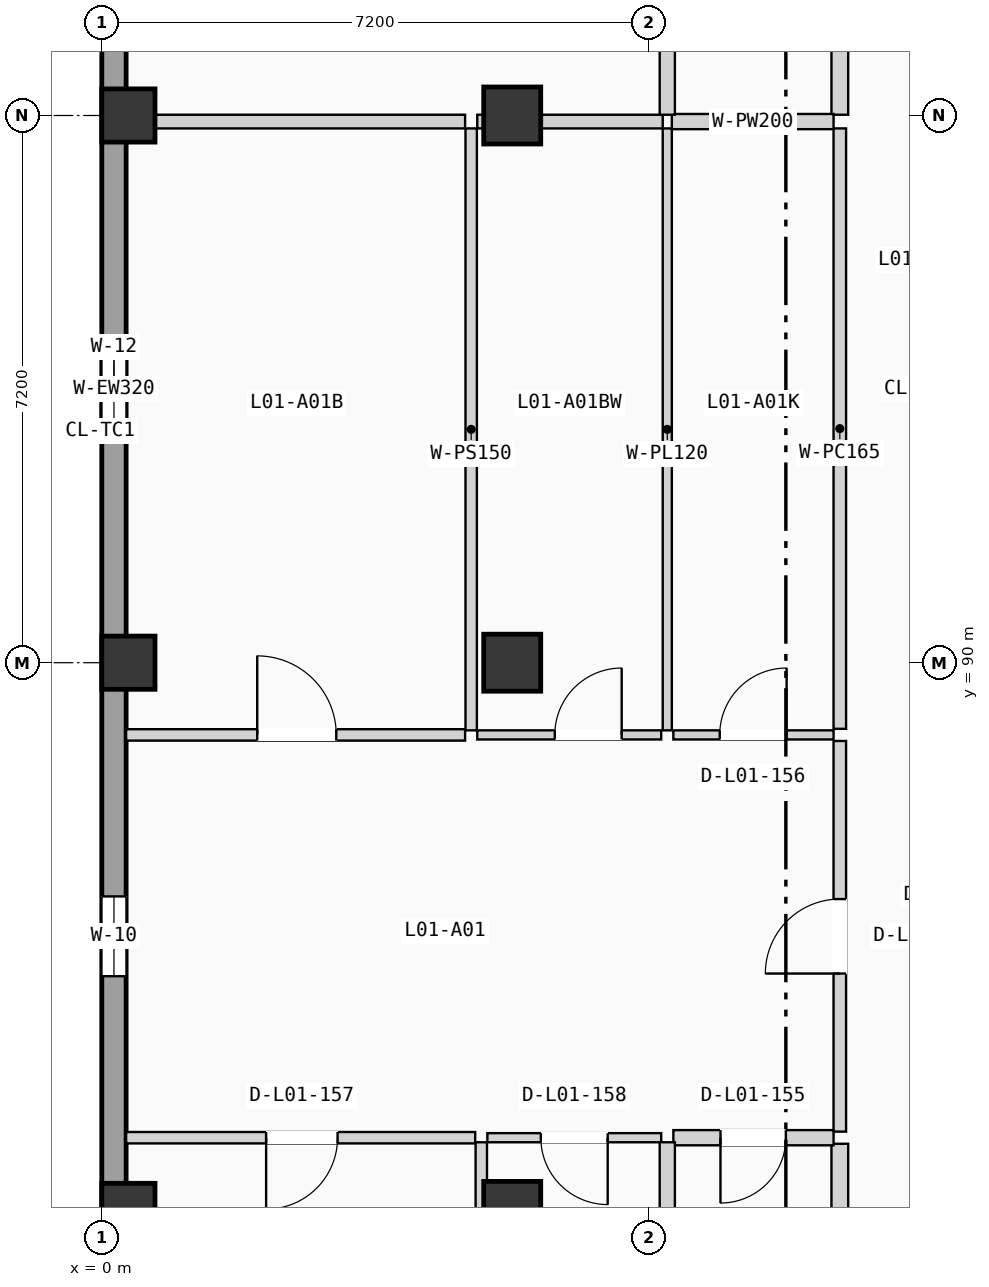
"""IFC4 building model, lengths in metres.
Left out: names, types, materials, properties, quantities, classifications, styles, units other than length and angle.
Written with IfcOpenShell. Run it as: python <this file> out.ifc"""

import sys

from ifc_helpers import new_model, si_unit, direction, frame, frame_2d, origin, origin_2d, place, context, subcontext, project, spatial, rectangle, extrude, element, fill, save


model = new_model("IFC4")
c1 = context("Model", 3, precision=1e-05, world=origin(), true_north=direction((0.0, 1.0)))
c2 = subcontext(c1, "Body", "Model", "MODEL_VIEW")
j1 = project(units=[si_unit("LENGTHUNIT", "METRE"), si_unit("PLANEANGLEUNIT", "RADIAN")], contexts=[c1])
p1 = place(None, origin())
s1 = spatial("IfcSite", under=j1, at=p1, CompositionType="ELEMENT")
p2 = place(p1, origin())
s2 = spatial("IfcBuilding", under=s1, at=p2, CompositionType="ELEMENT")
p3 = place(p2, frame((0.0, 0.0, 4.9)))
s3 = spatial("IfcBuildingStorey", under=s2, at=p3, CompositionType="ELEMENT", Elevation=4.9)
for number, where, z_axis, x_axis in (
    (1, (0.35, 82.8, 0.0), (0.0, 0.0, 1.0), (1.0, 0.0, 0.0)),
    (2, (0.35, 90.0, 0.0), (0.0, 0.0, 1.0), (1.0, 0.0, 0.0)),
    (3, (0.35, 97.2, 0.0), (0.0, 0.0, 1.0), (1.0, 0.0, 0.0)),
):
    element("IfcColumn", number, at=place(p3, frame(where, z_axis=z_axis, x_axis=x_axis)), inside=s3, PredefinedType="COLUMN", context=c2, shape_type="SweptSolid", body=[
        extrude(rectangle(XDim=0.7, YDim=0.7, at=origin_2d()), origin(), (0.0, 0.0, 1.0), 3.675),
    ])
for number, where, z_axis, x_axis in (
    (4, (5.4, 82.8, 0.0), (0.0, 0.0, 1.0), (1.0, 0.0, 0.0)),
    (5, (5.4, 90.0, 0.0), (0.0, 0.0, 1.0), (1.0, 0.0, 0.0)),
    (6, (5.4, 97.2, 0.0), (0.0, 0.0, 1.0), (1.0, 0.0, 0.0)),
):
    element("IfcColumn", number, at=place(p3, frame(where, z_axis=z_axis, x_axis=x_axis)), inside=s3, PredefinedType="COLUMN", context=c2, shape_type="SweptSolid", body=[
        extrude(rectangle(XDim=0.75, YDim=0.75, at=origin_2d()), origin(), (0.0, 0.0, 1.0), 3.675),
    ])
p4 = place(p3, frame((0.16, 68.72, 0.0), z_axis=(0.0, 0.0, 1.0), x_axis=(0.0, 1.0, 0.0)))
e7 = element("IfcWall", 7, at=p4, inside=s3, PredefinedType="SOLIDWALL", context=c2, shape_type="SweptSolid", body=[
    extrude(rectangle(XDim=49.76, YDim=0.32, at=frame_2d((24.88, 0.0))), origin(), (0.0, 0.0, 1.0), 3.415),
])
p5 = place(p4, frame((17.155, 0.0, 0.9)))
e8 = element("IfcOpeningElement", 8, at=p5, cuts=e7, PredefinedType="OPENING", context=c2, shape_type="SweptSolid", body=[
    extrude(rectangle(XDim=1.05, YDim=1.8, at=frame_2d((0.525, 0.9))), frame((0.0, 0.17, 0.0), z_axis=(0.0, -1.0, 0.0), x_axis=(1.0, 0.0, 0.0)), (0.0, 0.0, 1.0), 0.34),
])
p6 = place(p4, frame((9.97, 0.0, 0.9)))
e9 = element("IfcOpeningElement", 9, at=p6, cuts=e7, PredefinedType="OPENING", context=c2, shape_type="SweptSolid", body=[
    extrude(rectangle(XDim=1.15, YDim=1.2, at=frame_2d((0.575, 0.6))), frame((0.0, 0.17, 0.0), z_axis=(0.0, -1.0, 0.0), x_axis=(1.0, 0.0, 0.0)), (0.0, 0.0, 1.0), 0.34),
])
p7 = place(p4, frame((24.305, 0.0, 0.9)))
e10 = element("IfcOpeningElement", 10, at=p7, cuts=e7, PredefinedType="OPENING", context=c2, shape_type="SweptSolid", body=[
    extrude(rectangle(XDim=1.15, YDim=1.35, at=frame_2d((0.575, 0.675))), frame((0.0, 0.17, 0.0), z_axis=(0.0, -1.0, 0.0), x_axis=(1.0, 0.0, 0.0)), (0.0, 0.0, 1.0), 0.34),
])
p8 = place(p4, frame((33.584, 0.0, 0.9)))
e11 = element("IfcOpeningElement", 11, at=p8, cuts=e7, PredefinedType="OPENING", context=c2, shape_type="SweptSolid", body=[
    extrude(rectangle(XDim=1.15, YDim=1.5, at=frame_2d((0.575, 0.75))), frame((0.0, 0.17, 0.0), z_axis=(0.0, -1.0, 0.0), x_axis=(1.0, 0.0, 0.0)), (0.0, 0.0, 1.0), 0.34),
])
p9 = place(p4, frame((30.174, 0.0, 0.9)))
e12 = element("IfcOpeningElement", 12, at=p9, cuts=e7, PredefinedType="OPENING", context=c2, shape_type="SweptSolid", body=[
    extrude(rectangle(XDim=1.15, YDim=1.65, at=frame_2d((0.575, 0.825))), frame((0.0, 0.17, 0.0), z_axis=(0.0, -1.0, 0.0), x_axis=(1.0, 0.0, 0.0)), (0.0, 0.0, 1.0), 0.34),
])
p10 = place(p4, frame((39.776, 0.0, 0.9)))
e13 = element("IfcOpeningElement", 13, at=p10, cuts=e7, PredefinedType="OPENING", context=c2, shape_type="SweptSolid", body=[
    extrude(rectangle(XDim=1.15, YDim=1.8, at=frame_2d((0.575, 0.9))), frame((0.0, 0.17, 0.0), z_axis=(0.0, -1.0, 0.0), x_axis=(1.0, 0.0, 0.0)), (0.0, 0.0, 1.0), 0.34),
])
p11 = place(p3, frame((9.71, 83.83, 0.0), z_axis=(0.0, 0.0, 1.0), x_axis=(0.0, 1.0, 0.0)))
e14 = element("IfcWall", 14, at=p11, inside=s3, PredefinedType="PARTITIONING", context=c2, shape_type="SweptSolid", body=[
    extrude(rectangle(XDim=5.14, YDim=0.165, at=frame_2d((2.57, 0.0))), origin(), (0.0, 0.0, 1.0), 3.395),
])
p12 = place(p11, frame((2.08, 0.0, 0.0)))
e15 = element("IfcOpeningElement", 15, at=p12, cuts=e14, PredefinedType="OPENING", context=c2, shape_type="SweptSolid", body=[
    extrude(rectangle(XDim=0.98, YDim=2.08, at=frame_2d((0.49, 1.04))), frame((0.0, 0.093, 0.0), z_axis=(0.0, -1.0, 0.0), x_axis=(1.0, 0.0, 0.0)), (0.0, 0.0, 1.0), 0.185),
])
p13 = place(p3, frame((9.71, 76.0, 0.0), z_axis=(0.0, 0.0, 1.0), x_axis=(0.0, 1.0, 0.0)))
e16 = element("IfcWall", 16, at=p13, inside=s3, PredefinedType="PLUMBINGWALL", context=c2, shape_type="SweptSolid", body=[
    extrude(rectangle(XDim=7.67, YDim=0.22, at=frame_2d((3.835, 0.0))), origin(), (0.0, 0.0, 1.0), 3.395),
])
p14 = place(p3, frame((9.71, 89.13, 0.0), z_axis=(0.0, 0.0, 1.0), x_axis=(0.0, 1.0, 0.0)))
e17 = element("IfcWall", 17, at=p14, inside=s3, PredefinedType="PARTITIONING", context=c2, shape_type="SweptSolid", body=[
    extrude(rectangle(XDim=7.9, YDim=0.165, at=frame_2d((3.95, 0.0))), origin(), (0.0, 0.0, 1.0), 3.395),
])
p15 = place(p3, frame((9.71, 97.21, 0.0), z_axis=(0.0, 0.0, 1.0), x_axis=(0.0, 1.0, 0.0)))
e18 = element("IfcWall", 18, at=p15, inside=s3, PredefinedType="PLUMBINGWALL", context=c2, shape_type="SweptSolid", body=[
    extrude(rectangle(XDim=4.257, YDim=0.22, at=frame_2d((2.128, 0.0))), origin(), (0.0, 0.0, 1.0), 3.395),
])
p16 = place(p3, frame((7.52, 83.75, 0.0), z_axis=(0.0, 0.0, 1.0), x_axis=(1.0, 0.0, 0.0)))
e19 = element("IfcWall", 19, at=p16, inside=s3, PredefinedType="PLUMBINGWALL", context=c2, shape_type="SweptSolid", body=[
    extrude(rectangle(XDim=2.108, YDim=0.2, at=frame_2d((1.054, 0.0))), origin(), (0.0, 0.0, 1.0), 3.395),
])
p17 = place(p16, frame((0.62, 0.0, 0.0)))
e20 = element("IfcOpeningElement", 20, at=p17, cuts=e19, PredefinedType="OPENING", context=c2, shape_type="SweptSolid", body=[
    extrude(rectangle(XDim=0.86, YDim=2.0, at=frame_2d((0.43, 1.0))), frame((0.0, 0.11, 0.0), z_axis=(0.0, -1.0, 0.0), x_axis=(1.0, 0.0, 0.0)), (0.0, 0.0, 1.0), 0.22),
])
p18 = place(p3, frame((7.52, 89.05, 0.0), z_axis=(0.0, 0.0, 1.0), x_axis=(1.0, 0.0, 0.0)))
e21 = element("IfcWall", 21, at=p18, inside=s3, PredefinedType="PARTITIONING", context=c2, shape_type="SweptSolid", body=[
    extrude(rectangle(XDim=2.108, YDim=0.12, at=frame_2d((1.054, 0.0))), origin(), (0.0, 0.0, 1.0), 3.395),
])
p19 = place(p18, frame((0.61, 0.0, 0.0)))
e22 = element("IfcOpeningElement", 22, at=p19, cuts=e21, PredefinedType="OPENING", context=c2, shape_type="SweptSolid", body=[
    extrude(rectangle(XDim=0.88, YDim=2.02, at=frame_2d((0.44, 1.01))), frame((0.0, 0.07, 0.0), z_axis=(0.0, -1.0, 0.0), x_axis=(1.0, 0.0, 0.0)), (0.0, 0.0, 1.0), 0.14),
])
p20 = place(p3, frame((0.32, 83.75, 0.0), z_axis=(0.0, 0.0, 1.0), x_axis=(1.0, 0.0, 0.0)))
e23 = element("IfcWall", 23, at=p20, inside=s3, PredefinedType="PARTITIONING", context=c2, shape_type="SweptSolid", body=[
    extrude(rectangle(XDim=4.593, YDim=0.15, at=frame_2d((2.296, 0.0))), origin(), (0.0, 0.0, 1.0), 3.395),
])
p21 = place(p20, frame((1.842, 0.0, 0.0)))
e24 = element("IfcOpeningElement", 24, at=p21, cuts=e23, PredefinedType="OPENING", context=c2, shape_type="SweptSolid", body=[
    extrude(rectangle(XDim=0.94, YDim=2.06, at=frame_2d((0.47, 1.03))), frame((0.0, 0.085, 0.0), z_axis=(0.0, -1.0, 0.0), x_axis=(1.0, 0.0, 0.0)), (0.0, 0.0, 1.0), 0.17),
])
p22 = place(p3, frame((5.073, 83.75, 0.0), z_axis=(0.0, 0.0, 1.0), x_axis=(1.0, 0.0, 0.0)))
e25 = element("IfcWall", 25, at=p22, inside=s3, PredefinedType="PARTITIONING", context=c2, shape_type="SweptSolid", body=[
    extrude(rectangle(XDim=2.287, YDim=0.12, at=frame_2d((1.144, 0.0))), origin(), (0.0, 0.0, 1.0), 3.395),
])
p23 = place(p22, frame((0.703, 0.0, 0.0)))
e26 = element("IfcOpeningElement", 26, at=p23, cuts=e25, PredefinedType="OPENING", context=c2, shape_type="SweptSolid", body=[
    extrude(rectangle(XDim=0.88, YDim=2.02, at=frame_2d((0.44, 1.01))), frame((0.0, 0.07, 0.0), z_axis=(0.0, -1.0, 0.0), x_axis=(1.0, 0.0, 0.0)), (0.0, 0.0, 1.0), 0.14),
])
p24 = place(p3, frame((0.32, 89.05, 0.0), z_axis=(0.0, 0.0, 1.0), x_axis=(1.0, 0.0, 0.0)))
e27 = element("IfcWall", 27, at=p24, inside=s3, PredefinedType="PARTITIONING", context=c2, shape_type="SweptSolid", body=[
    extrude(rectangle(XDim=4.46, YDim=0.15, at=frame_2d((2.23, 0.0))), origin(), (0.0, 0.0, 1.0), 3.395),
])
p25 = place(p24, frame((1.725, 0.0, 0.0)))
e28 = element("IfcOpeningElement", 28, at=p25, cuts=e27, PredefinedType="OPENING", context=c2, shape_type="SweptSolid", body=[
    extrude(rectangle(XDim=1.04, YDim=2.08, at=frame_2d((0.52, 1.04))), frame((0.0, 0.085, 0.0), z_axis=(0.0, -1.0, 0.0), x_axis=(1.0, 0.0, 0.0)), (0.0, 0.0, 1.0), 0.17),
])
p26 = place(p3, frame((4.94, 89.05, 0.0), z_axis=(0.0, 0.0, 1.0), x_axis=(1.0, 0.0, 0.0)))
e29 = element("IfcWall", 29, at=p26, inside=s3, PredefinedType="PARTITIONING", context=c2, shape_type="SweptSolid", body=[
    extrude(rectangle(XDim=2.42, YDim=0.12, at=frame_2d((1.21, 0.0))), origin(), (0.0, 0.0, 1.0), 3.395),
])
p27 = place(p26, frame((1.02, 0.0, 0.0)))
e30 = element("IfcOpeningElement", 30, at=p27, cuts=e29, PredefinedType="OPENING", context=c2, shape_type="SweptSolid", body=[
    extrude(rectangle(XDim=0.88, YDim=2.02, at=frame_2d((0.44, 1.01))), frame((0.0, 0.07, 0.0), z_axis=(0.0, -1.0, 0.0), x_axis=(1.0, 0.0, 0.0)), (0.0, 0.0, 1.0), 0.14),
])
p28 = place(p3, frame((7.44, 76.0, 0.0), z_axis=(0.0, 0.0, 1.0), x_axis=(0.0, 1.0, 0.0)))
e31 = element("IfcWall", 31, at=p28, inside=s3, PredefinedType="PLUMBINGWALL", context=c2, shape_type="SweptSolid", body=[
    extrude(rectangle(XDim=7.69, YDim=0.2, at=frame_2d((3.845, 0.0))), origin(), (0.0, 0.0, 1.0), 3.395),
])
p29 = place(p28, frame((3.41, 0.0, 0.0)))
e32 = element("IfcOpeningElement", 32, at=p29, cuts=e31, PredefinedType="OPENING", context=c2, shape_type="SweptSolid", body=[
    extrude(rectangle(XDim=0.85, YDim=2.01, at=frame_2d((0.425, 1.005))), frame((0.0, 0.11, 0.0), z_axis=(0.0, -1.0, 0.0), x_axis=(1.0, 0.0, 0.0)), (0.0, 0.0, 1.0), 0.22),
])
p30 = place(p3, frame((7.44, 89.11, 0.0), z_axis=(0.0, 0.0, 1.0), x_axis=(0.0, 1.0, 0.0)))
e33 = element("IfcWall", 33, at=p30, inside=s3, PredefinedType="PARTITIONING", context=c2, shape_type="SweptSolid", body=[
    extrude(rectangle(XDim=7.92, YDim=0.12, at=frame_2d((3.96, 0.0))), origin(), (0.0, 0.0, 1.0), 3.395),
])
p31 = place(p3, frame((7.5, 97.12, 0.0), z_axis=(0.0, 0.0, 1.0), x_axis=(1.0, 0.0, 0.0)))
e34 = element("IfcWall", 34, at=p31, inside=s3, PredefinedType="PLUMBINGWALL", context=c2, shape_type="SweptSolid", body=[
    extrude(rectangle(XDim=2.128, YDim=0.2, at=frame_2d((1.064, 0.0))), origin(), (0.0, 0.0, 1.0), 2.685),
])
p32 = place(p3, frame((4.993, 76.0, 0.0), z_axis=(0.0, 0.0, 1.0), x_axis=(0.0, 1.0, 0.0)))
e35 = element("IfcWall", 35, at=p32, inside=s3, PredefinedType="PARTITIONING", context=c2, shape_type="SweptSolid", body=[
    extrude(rectangle(XDim=7.69, YDim=0.15, at=frame_2d((3.845, 0.0))), origin(), (0.0, 0.0, 1.0), 3.395),
])
p33 = place(p3, frame((4.86, 89.11, 0.0), z_axis=(0.0, 0.0, 1.0), x_axis=(0.0, 1.0, 0.0)))
e36 = element("IfcWall", 36, at=p33, inside=s3, PredefinedType="PARTITIONING", context=c2, shape_type="SweptSolid", body=[
    extrude(rectangle(XDim=7.92, YDim=0.15, at=frame_2d((3.96, 0.0))), origin(), (0.0, 0.0, 1.0), 3.395),
])
p34 = place(p3, frame((0.32, 97.12, 0.0), z_axis=(0.0, 0.0, 1.0), x_axis=(1.0, 0.0, 0.0)))
e37 = element("IfcWall", 37, at=p34, inside=s3, PredefinedType="PARTITIONING", context=c2, shape_type="SweptSolid", body=[
    extrude(rectangle(XDim=4.46, YDim=0.18, at=frame_2d((2.23, 0.0))), origin(), (0.0, 0.0, 1.0), 2.735),
])
p35 = place(p3, frame((4.94, 97.12, 0.0), z_axis=(0.0, 0.0, 1.0), x_axis=(1.0, 0.0, 0.0)))
e38 = element("IfcWall", 38, at=p35, inside=s3, PredefinedType="PARTITIONING", context=c2, shape_type="SweptSolid", body=[
    extrude(rectangle(XDim=2.44, YDim=0.18, at=frame_2d((1.22, 0.0))), origin(), (0.0, 0.0, 1.0), 2.685),
])
p36 = place(p3, frame((7.44, 97.21, 0.0), z_axis=(0.0, 0.0, 1.0), x_axis=(0.0, 1.0, 0.0)))
e39 = element("IfcWall", 39, at=p36, inside=s3, PredefinedType="PLUMBINGWALL", context=c2, shape_type="SweptSolid", body=[
    extrude(rectangle(XDim=4.257, YDim=0.2, at=frame_2d((2.128, 0.0))), origin(), (0.0, 0.0, 1.0), 3.395),
])
p37 = place(p5, origin())
e40 = element("IfcWindow", 40, at=p37, inside=s3, PartitioningType="SINGLE_PANEL", PredefinedType="WINDOW", context=c2, shape_type="SweptSolid", body=[
    extrude(rectangle(XDim=1.05, YDim=1.8, at=frame_2d((0.525, 0.9))), frame((0.0, 0.03, 0.0), z_axis=(0.0, -1.0, 0.0), x_axis=(1.0, 0.0, 0.0)), (0.0, 0.0, 1.0), 0.06),
])
fill(e8, e40)
p38 = place(p7, origin())
e41 = element("IfcWindow", 41, at=p38, inside=s3, PartitioningType="SINGLE_PANEL", PredefinedType="WINDOW", context=c2, shape_type="SweptSolid", body=[
    extrude(rectangle(XDim=1.15, YDim=1.35, at=frame_2d((0.575, 0.675))), frame((0.0, 0.03, 0.0), z_axis=(0.0, -1.0, 0.0), x_axis=(1.0, 0.0, 0.0)), (0.0, 0.0, 1.0), 0.06),
])
fill(e10, e41)
p39 = place(p12, origin())
e42 = element("IfcDoor", 42, at=p39, inside=s3, OperationType="SINGLE_SWING_LEFT", PredefinedType="DOOR", context=c2, shape_type="SweptSolid", body=[
    extrude(rectangle(XDim=0.98, YDim=2.08, at=frame_2d((0.49, 1.04))), frame((0.0, 0.025, 0.0), z_axis=(0.0, -1.0, 0.0), x_axis=(1.0, 0.0, 0.0)), (0.0, 0.0, 1.0), 0.05),
])
fill(e15, e42)
p40 = place(p17, frame((0.86, 0.0, 0.0), z_axis=(0.0, 0.0, 1.0), x_axis=(-1.0, 0.0, 0.0)))
e43 = element("IfcDoor", 43, at=p40, inside=s3, OperationType="SINGLE_SWING_LEFT", PredefinedType="DOOR", context=c2, shape_type="SweptSolid", body=[
    extrude(rectangle(XDim=0.86, YDim=2.0, at=frame_2d((0.43, 1.0))), frame((0.0, 0.025, 0.0), z_axis=(0.0, -1.0, 0.0), x_axis=(1.0, 0.0, 0.0)), (0.0, 0.0, 1.0), 0.05),
])
fill(e20, e43)
p41 = place(p19, origin())
e44 = element("IfcDoor", 44, at=p41, inside=s3, OperationType="SINGLE_SWING_RIGHT", PredefinedType="DOOR", context=c2, shape_type="SweptSolid", body=[
    extrude(rectangle(XDim=0.88, YDim=2.02, at=frame_2d((0.44, 1.01))), frame((0.0, 0.025, 0.0), z_axis=(0.0, -1.0, 0.0), x_axis=(1.0, 0.0, 0.0)), (0.0, 0.0, 1.0), 0.05),
])
fill(e22, e44)
p42 = place(p21, frame((0.94, 0.0, 0.0), z_axis=(0.0, 0.0, 1.0), x_axis=(-1.0, 0.0, 0.0)))
e45 = element("IfcDoor", 45, at=p42, inside=s3, OperationType="SINGLE_SWING_LEFT", PredefinedType="DOOR", context=c2, shape_type="SweptSolid", body=[
    extrude(rectangle(XDim=0.94, YDim=2.06, at=frame_2d((0.47, 1.03))), frame((0.0, 0.025, 0.0), z_axis=(0.0, -1.0, 0.0), x_axis=(1.0, 0.0, 0.0)), (0.0, 0.0, 1.0), 0.05),
])
fill(e24, e45)
p43 = place(p23, frame((0.88, 0.0, 0.0), z_axis=(0.0, 0.0, 1.0), x_axis=(-1.0, 0.0, 0.0)))
e46 = element("IfcDoor", 46, at=p43, inside=s3, OperationType="SINGLE_SWING_RIGHT", PredefinedType="DOOR", context=c2, shape_type="SweptSolid", body=[
    extrude(rectangle(XDim=0.88, YDim=2.02, at=frame_2d((0.44, 1.01))), frame((0.0, 0.025, 0.0), z_axis=(0.0, -1.0, 0.0), x_axis=(1.0, 0.0, 0.0)), (0.0, 0.0, 1.0), 0.05),
])
fill(e26, e46)
p44 = place(p25, origin())
e47 = element("IfcDoor", 47, at=p44, inside=s3, OperationType="SINGLE_SWING_LEFT", PredefinedType="DOOR", context=c2, shape_type="SweptSolid", body=[
    extrude(rectangle(XDim=1.04, YDim=2.08, at=frame_2d((0.52, 1.04))), frame((0.0, 0.025, 0.0), z_axis=(0.0, -1.0, 0.0), x_axis=(1.0, 0.0, 0.0)), (0.0, 0.0, 1.0), 0.05),
])
fill(e28, e47)
p45 = place(p27, origin())
e48 = element("IfcDoor", 48, at=p45, inside=s3, OperationType="SINGLE_SWING_RIGHT", PredefinedType="DOOR", context=c2, shape_type="SweptSolid", body=[
    extrude(rectangle(XDim=0.88, YDim=2.02, at=frame_2d((0.44, 1.01))), frame((0.0, 0.025, 0.0), z_axis=(0.0, -1.0, 0.0), x_axis=(1.0, 0.0, 0.0)), (0.0, 0.0, 1.0), 0.05),
])
fill(e30, e48)
save(model, sys.argv[1])
